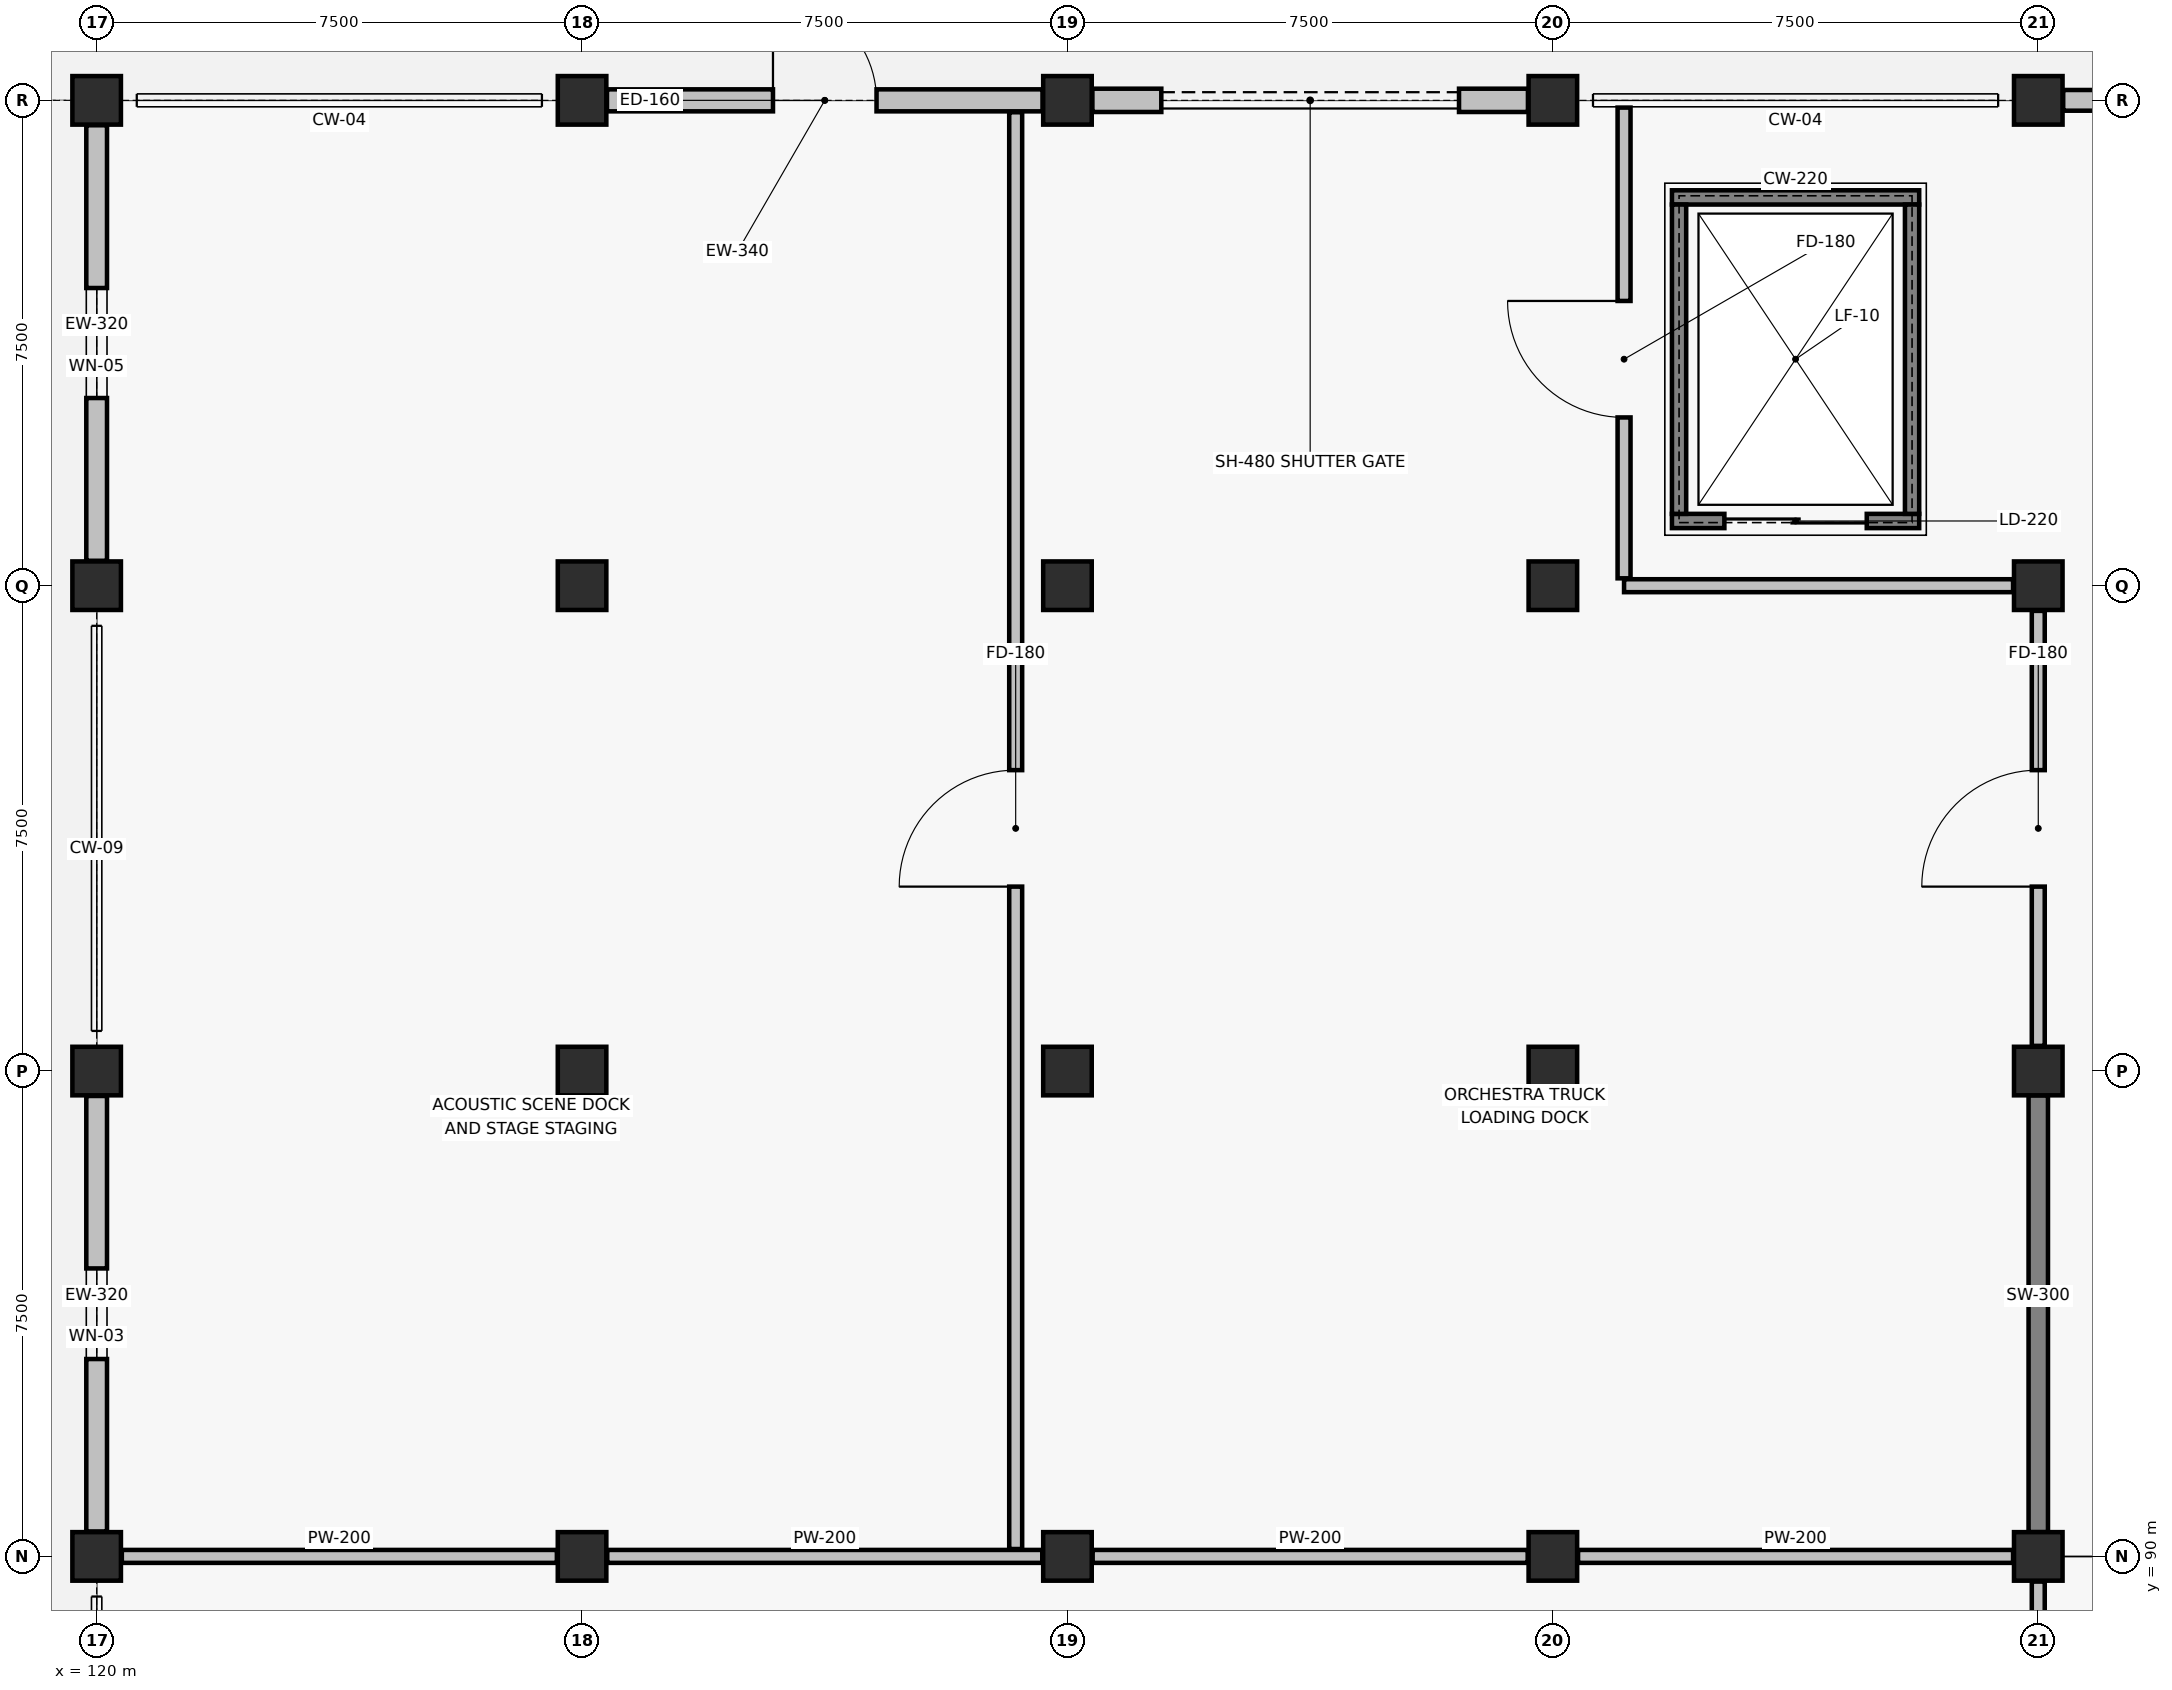
"""IFC4 building model, lengths in metres.
Left out: names, types, materials, properties, quantities, classifications, styles, units other than length and angle.
Written with IfcOpenShell. Run it as: python <this file> out.ifc"""

import sys

from ifc_helpers import new_model, si_unit, direction, frame, frame_2d, origin, origin_2d, place, context, subcontext, project, spatial, rectangle, extrude, element, fill, save


model = new_model("IFC4")
c1 = context("Model", 3, precision=1e-05, world=origin(), true_north=direction((0.0, 1.0)))
c2 = subcontext(c1, "Body", "Model", "MODEL_VIEW")
j1 = project(units=[si_unit("LENGTHUNIT", "METRE"), si_unit("PLANEANGLEUNIT", "RADIAN")], contexts=[c1])
p1 = place(None, origin())
s1 = spatial("IfcSite", under=j1, at=p1, CompositionType="ELEMENT")
p2 = place(p1, origin())
s2 = spatial("IfcBuilding", under=s1, at=p2, CompositionType="ELEMENT")
p3 = place(p2, origin())
s3 = spatial("IfcBuildingStorey", under=s2, at=p3, CompositionType="ELEMENT", Elevation=0.0)
for number, where, z_axis, x_axis in (
    (1, (120.0, 90.0, 0.0), (0.0, 0.0, 1.0), (1.0, 0.0, 0.0)),
    (2, (120.0, 97.5, 0.0), (0.0, 0.0, 1.0), (1.0, 0.0, 0.0)),
    (3, (120.0, 105.0, 0.0), (0.0, 0.0, 1.0), (1.0, 0.0, 0.0)),
    (4, (120.0, 112.5, 0.0), (0.0, 0.0, 1.0), (1.0, 0.0, 0.0)),
    (5, (127.5, 90.0, 0.0), (0.0, 0.0, 1.0), (1.0, 0.0, 0.0)),
    (6, (127.5, 97.5, 0.0), (0.0, 0.0, 1.0), (1.0, 0.0, 0.0)),
    (7, (127.5, 105.0, 0.0), (0.0, 0.0, 1.0), (1.0, 0.0, 0.0)),
    (8, (127.5, 112.5, 0.0), (0.0, 0.0, 1.0), (1.0, 0.0, 0.0)),
    (9, (135.0, 90.0, 0.0), (0.0, 0.0, 1.0), (1.0, 0.0, 0.0)),
    (10, (135.0, 97.5, 0.0), (0.0, 0.0, 1.0), (1.0, 0.0, 0.0)),
    (11, (135.0, 105.0, 0.0), (0.0, 0.0, 1.0), (1.0, 0.0, 0.0)),
    (12, (135.0, 112.5, 0.0), (0.0, 0.0, 1.0), (1.0, 0.0, 0.0)),
    (13, (142.5, 90.0, 0.0), (0.0, 0.0, 1.0), (1.0, 0.0, 0.0)),
    (14, (142.5, 97.5, 0.0), (0.0, 0.0, 1.0), (1.0, 0.0, 0.0)),
    (15, (142.5, 105.0, 0.0), (0.0, 0.0, 1.0), (1.0, 0.0, 0.0)),
    (16, (142.5, 112.5, 0.0), (0.0, 0.0, 1.0), (1.0, 0.0, 0.0)),
    (17, (150.0, 90.0, 0.0), (0.0, 0.0, 1.0), (1.0, 0.0, 0.0)),
    (18, (150.0, 97.5, 0.0), (0.0, 0.0, 1.0), (1.0, 0.0, 0.0)),
    (19, (150.0, 105.0, 0.0), (0.0, 0.0, 1.0), (1.0, 0.0, 0.0)),
    (20, (150.0, 112.5, 0.0), (0.0, 0.0, 1.0), (1.0, 0.0, 0.0)),
):
    element("IfcColumn", number, at=place(p3, frame(where, z_axis=z_axis, x_axis=x_axis)), inside=s3, PredefinedType="COLUMN", context=c2, shape_type="SweptSolid", body=[
        extrude(rectangle(XDim=0.75, YDim=0.75, at=origin_2d()), origin(), (0.0, 0.0, 1.0), 4.8),
    ])
p4 = place(p3, frame((150.0, 90.375, 0.0), z_axis=(0.0, 0.0, 1.0), x_axis=(0.0, 1.0, 0.0)))
e21 = element("IfcWall", 21, at=p4, inside=s3, PredefinedType="SHEAR", context=c2, shape_type="SweptSolid", body=[
    extrude(rectangle(XDim=6.75, YDim=0.3, at=frame_2d((3.375, 0.0))), origin(), (0.0, 0.0, 1.0), 4.5),
])
p5 = place(p3, frame((127.885, 112.5, 0.0), z_axis=(0.0, 0.0, 1.0), x_axis=(1.0, 0.0, 0.0)))
e22 = element("IfcWall", 22, at=p5, inside=s3, PredefinedType="SOLIDWALL", context=c2, shape_type="SweptSolid", body=[
    extrude(rectangle(XDim=6.73, YDim=0.34, at=frame_2d((3.365, 0.0))), origin(), (0.0, 0.0, 1.0), 3.72),
])
p6 = place(p5, frame((2.565, 0.0, 0.0)))
e23 = element("IfcOpeningElement", 23, at=p6, cuts=e22, PredefinedType="OPENING", context=c2, shape_type="SweptSolid", body=[
    extrude(rectangle(XDim=1.6, YDim=2.15, at=frame_2d((0.8, 1.075))), frame((0.0, 0.18, 0.0), z_axis=(0.0, -1.0, 0.0), x_axis=(1.0, 0.0, 0.0)), (0.0, 0.0, 1.0), 0.36),
])
p7 = place(p3, frame((135.385, 112.5, 0.0), z_axis=(0.0, 0.0, 1.0), x_axis=(1.0, 0.0, 0.0)))
e24 = element("IfcWall", 24, at=p7, inside=s3, PredefinedType="SOLIDWALL", context=c2, shape_type="SweptSolid", body=[
    extrude(rectangle(XDim=6.73, YDim=0.36, at=frame_2d((3.365, 0.0))), origin(), (0.0, 0.0, 1.0), 3.72),
])
p8 = place(p7, frame((1.065, 0.0, 0.0)))
e25 = element("IfcOpeningElement", 25, at=p8, cuts=e24, PredefinedType="OPENING", context=c2, shape_type="SweptSolid", body=[
    extrude(rectangle(XDim=4.6, YDim=3.1, at=frame_2d((2.3, 1.55))), frame((0.0, 0.19, 0.0), z_axis=(0.0, -1.0, 0.0), x_axis=(1.0, 0.0, 0.0)), (0.0, 0.0, 1.0), 0.38),
])
p9 = place(p3, frame((150.385, 112.5, 0.0), z_axis=(0.0, 0.0, 1.0), x_axis=(1.0, 0.0, 0.0)))
e26 = element("IfcWall", 26, at=p9, inside=s3, PredefinedType="SOLIDWALL", context=c2, shape_type="SweptSolid", body=[
    extrude(rectangle(XDim=6.73, YDim=0.32, at=frame_2d((3.365, 0.0))), origin(), (0.0, 0.0, 1.0), 3.72),
])
p10 = place(p9, frame((2.215, 0.0, 0.6)))
e27 = element("IfcOpeningElement", 27, at=p10, cuts=e26, PredefinedType="OPENING", context=c2, shape_type="SweptSolid", body=[
    extrude(rectangle(XDim=2.3, YDim=1.3, at=frame_2d((1.15, 0.65))), frame((0.0, 0.17, 0.0), z_axis=(0.0, -1.0, 0.0), x_axis=(1.0, 0.0, 0.0)), (0.0, 0.0, 1.0), 0.34),
])
p11 = place(p3, frame((120.0, 90.385, 0.0), z_axis=(0.0, 0.0, 1.0), x_axis=(0.0, 1.0, 0.0)))
e28 = element("IfcWall", 28, at=p11, inside=s3, PredefinedType="SOLIDWALL", context=c2, shape_type="SweptSolid", body=[
    extrude(rectangle(XDim=6.73, YDim=0.32, at=frame_2d((3.365, 0.0))), origin(), (0.0, 0.0, 1.0), 3.57),
])
p12 = place(p11, frame((2.665, 0.0, 0.6)))
e29 = element("IfcOpeningElement", 29, at=p12, cuts=e28, PredefinedType="OPENING", context=c2, shape_type="SweptSolid", body=[
    extrude(rectangle(XDim=1.4, YDim=1.8, at=frame_2d((0.7, 0.9))), frame((0.0, 0.17, 0.0), z_axis=(0.0, -1.0, 0.0), x_axis=(1.0, 0.0, 0.0)), (0.0, 0.0, 1.0), 0.34),
])
p13 = place(p3, frame((120.0, 105.385, 0.0), z_axis=(0.0, 0.0, 1.0), x_axis=(0.0, 1.0, 0.0)))
e30 = element("IfcWall", 30, at=p13, inside=s3, PredefinedType="SOLIDWALL", context=c2, shape_type="SweptSolid", body=[
    extrude(rectangle(XDim=6.73, YDim=0.32, at=frame_2d((3.365, 0.0))), origin(), (0.0, 0.0, 1.0), 3.62),
])
p14 = place(p13, frame((2.515, 0.0, 0.6)))
e31 = element("IfcOpeningElement", 31, at=p14, cuts=e30, PredefinedType="OPENING", context=c2, shape_type="SweptSolid", body=[
    extrude(rectangle(XDim=1.7, YDim=1.8, at=frame_2d((0.85, 0.9))), frame((0.0, 0.17, 0.0), z_axis=(0.0, -1.0, 0.0), x_axis=(1.0, 0.0, 0.0)), (0.0, 0.0, 1.0), 0.34),
])
p15 = place(p3, frame((144.34, 106.0, 0.0), z_axis=(0.0, 0.0, 1.0), x_axis=(1.0, 0.0, 0.0)))
e32 = element("IfcWall", 32, at=p15, inside=s3, PredefinedType="SOLIDWALL", context=c2, shape_type="SweptSolid", body=[
    extrude(rectangle(XDim=3.82, YDim=0.22, at=frame_2d((1.91, 0.0))), origin(), (0.0, 0.0, 1.0), 4.5),
])
p16 = place(p15, frame((0.81, 0.0, 0.0)))
e33 = element("IfcOpeningElement", 33, at=p16, cuts=e32, PredefinedType="OPENING", context=c2, shape_type="SweptSolid", body=[
    extrude(rectangle(XDim=2.2, YDim=2.35, at=frame_2d((1.1, 1.175))), frame((0.0, 0.12, 0.0), z_axis=(0.0, -1.0, 0.0), x_axis=(1.0, 0.0, 0.0)), (0.0, 0.0, 1.0), 0.24),
])
p17 = place(p3, frame((144.34, 111.0, 0.0), z_axis=(0.0, 0.0, 1.0), x_axis=(1.0, 0.0, 0.0)))
e34 = element("IfcWall", 34, at=p17, inside=s3, PredefinedType="SOLIDWALL", context=c2, shape_type="SweptSolid", body=[
    extrude(rectangle(XDim=3.82, YDim=0.22, at=frame_2d((1.91, 0.0))), origin(), (0.0, 0.0, 1.0), 4.5),
])
for number, where, z_axis, x_axis in (
    (35, (144.45, 106.11, 0.0), (0.0, 0.0, 1.0), (0.0, 1.0, 0.0)),
    (36, (148.05, 106.11, 0.0), (0.0, 0.0, 1.0), (0.0, 1.0, 0.0)),
):
    element("IfcWall", number, at=place(p3, frame(where, z_axis=z_axis, x_axis=x_axis)), inside=s3, PredefinedType="SOLIDWALL", context=c2, shape_type="SweptSolid", body=[
        extrude(rectangle(XDim=4.78, YDim=0.22, at=frame_2d((2.39, 0.0))), origin(), (0.0, 0.0, 1.0), 4.5),
    ])
p18 = place(p3, frame((143.6, 105.0, 0.0), z_axis=(0.0, 0.0, 1.0), x_axis=(1.0, 0.0, 0.0)))
e37 = element("IfcWall", 37, at=p18, inside=s3, PredefinedType="PARTITIONING", context=c2, shape_type="SweptSolid", body=[
    extrude(rectangle(XDim=6.011, YDim=0.2, at=frame_2d((3.005, 0.0))), origin(), (0.0, 0.0, 1.0), 3.62),
])
p19 = place(p3, frame((143.6, 105.114, 0.0), z_axis=(0.0, 0.0, 1.0), x_axis=(0.0, 1.0, 0.0)))
e38 = element("IfcWall", 38, at=p19, inside=s3, PredefinedType="PARTITIONING", context=c2, shape_type="SweptSolid", body=[
    extrude(rectangle(XDim=7.274, YDim=0.2, at=frame_2d((3.637, 0.0))), origin(), (0.0, 0.0, 1.0), 3.62),
])
p20 = place(p19, frame((2.486, 0.0, 0.0)))
e39 = element("IfcOpeningElement", 39, at=p20, cuts=e38, PredefinedType="OPENING", context=c2, shape_type="SweptSolid", body=[
    extrude(rectangle(XDim=1.8, YDim=2.18, at=frame_2d((0.9, 1.09))), frame((0.0, 0.11, 0.0), z_axis=(0.0, -1.0, 0.0), x_axis=(1.0, 0.0, 0.0)), (0.0, 0.0, 1.0), 0.22),
])
for number, where, z_axis, x_axis in (
    (40, (120.389, 90.0, 0.0), (0.0, 0.0, 1.0), (1.0, 0.0, 0.0)),
    (41, (127.889, 90.0, 0.0), (0.0, 0.0, 1.0), (1.0, 0.0, 0.0)),
    (42, (135.389, 90.0, 0.0), (0.0, 0.0, 1.0), (1.0, 0.0, 0.0)),
):
    element("IfcWall", number, at=place(p3, frame(where, z_axis=z_axis, x_axis=x_axis)), inside=s3, PredefinedType="PARTITIONING", context=c2, shape_type="SweptSolid", body=[
        extrude(rectangle(XDim=6.722, YDim=0.2, at=frame_2d((3.361, 0.0))), origin(), (0.0, 0.0, 1.0), 3.52),
    ])
p21 = place(p3, frame((142.889, 90.0, 0.0), z_axis=(0.0, 0.0, 1.0), x_axis=(1.0, 0.0, 0.0)))
e43 = element("IfcWall", 43, at=p21, inside=s3, PredefinedType="PARTITIONING", context=c2, shape_type="SweptSolid", body=[
    extrude(rectangle(XDim=6.722, YDim=0.2, at=frame_2d((3.361, 0.0))), origin(), (0.0, 0.0, 1.0), 3.42),
])
p22 = place(p3, frame((134.2, 90.114, 0.0), z_axis=(0.0, 0.0, 1.0), x_axis=(0.0, 1.0, 0.0)))
e44 = element("IfcWall", 44, at=p22, inside=s3, PredefinedType="PARTITIONING", context=c2, shape_type="SweptSolid", body=[
    extrude(rectangle(XDim=22.202, YDim=0.2, at=frame_2d((11.101, 0.0))), origin(), (0.0, 0.0, 1.0), 3.42),
])
p23 = place(p22, frame((10.236, 0.0, 0.0)))
e45 = element("IfcOpeningElement", 45, at=p23, cuts=e44, PredefinedType="OPENING", context=c2, shape_type="SweptSolid", body=[
    extrude(rectangle(XDim=1.8, YDim=2.18, at=frame_2d((0.9, 1.09))), frame((0.0, 0.11, 0.0), z_axis=(0.0, -1.0, 0.0), x_axis=(1.0, 0.0, 0.0)), (0.0, 0.0, 1.0), 0.22),
])
p24 = place(p3, frame((150.0, 82.889, 0.0), z_axis=(0.0, 0.0, 1.0), x_axis=(0.0, 1.0, 0.0)))
e46 = element("IfcWall", 46, at=p24, inside=s3, PredefinedType="PARTITIONING", context=c2, shape_type="SweptSolid", body=[
    extrude(rectangle(XDim=6.722, YDim=0.2, at=frame_2d((3.361, 0.0))), origin(), (0.0, 0.0, 1.0), 3.42),
])
p25 = place(p24, frame((2.261, 0.0, 0.0)))
e47 = element("IfcOpeningElement", 47, at=p25, cuts=e46, PredefinedType="OPENING", context=c2, shape_type="SweptSolid", body=[
    extrude(rectangle(XDim=2.2, YDim=2.18, at=frame_2d((1.1, 1.09))), frame((0.0, 0.11, 0.0), z_axis=(0.0, -1.0, 0.0), x_axis=(1.0, 0.0, 0.0)), (0.0, 0.0, 1.0), 0.22),
])
p26 = place(p3, frame((150.0, 97.889, 0.0), z_axis=(0.0, 0.0, 1.0), x_axis=(0.0, 1.0, 0.0)))
e48 = element("IfcWall", 48, at=p26, inside=s3, PredefinedType="PARTITIONING", context=c2, shape_type="SweptSolid", body=[
    extrude(rectangle(XDim=6.722, YDim=0.2, at=frame_2d((3.361, 0.0))), origin(), (0.0, 0.0, 1.0), 3.57),
])
p27 = place(p26, frame((2.461, 0.0, 0.0)))
e49 = element("IfcOpeningElement", 49, at=p27, cuts=e48, PredefinedType="OPENING", context=c2, shape_type="SweptSolid", body=[
    extrude(rectangle(XDim=1.8, YDim=2.18, at=frame_2d((0.9, 1.09))), frame((0.0, 0.11, 0.0), z_axis=(0.0, -1.0, 0.0), x_axis=(1.0, 0.0, 0.0)), (0.0, 0.0, 1.0), 0.22),
])
p28 = place(p6, origin())
e50 = element("IfcDoor", 50, at=p28, inside=s3, OperationType="SINGLE_SWING_LEFT", PredefinedType="DOOR", context=c2, shape_type="SweptSolid", body=[
    extrude(rectangle(XDim=1.6, YDim=2.15, at=frame_2d((0.8, 1.075))), frame((0.0, 0.025, 0.0), z_axis=(0.0, -1.0, 0.0), x_axis=(1.0, 0.0, 0.0)), (0.0, 0.0, 1.0), 0.05),
])
fill(e23, e50)
p29 = place(p8, origin())
e51 = element("IfcDoor", 51, at=p29, inside=s3, OperationType="ROLLINGUP", PredefinedType="GATE", context=c2, shape_type="SweptSolid", body=[
    extrude(rectangle(XDim=4.6, YDim=3.1, at=frame_2d((2.3, 1.55))), frame((0.0, 0.025, 0.0), z_axis=(0.0, -1.0, 0.0), x_axis=(1.0, 0.0, 0.0)), (0.0, 0.0, 1.0), 0.05),
])
fill(e25, e51)
p30 = place(p12, origin())
e52 = element("IfcWindow", 52, at=p30, inside=s3, PartitioningType="SINGLE_PANEL", PredefinedType="WINDOW", context=c2, shape_type="SweptSolid", body=[
    extrude(rectangle(XDim=1.4, YDim=1.8, at=frame_2d((0.7, 0.9))), frame((0.0, 0.03, 0.0), z_axis=(0.0, -1.0, 0.0), x_axis=(1.0, 0.0, 0.0)), (0.0, 0.0, 1.0), 0.06),
])
fill(e29, e52)
p31 = place(p14, origin())
e53 = element("IfcWindow", 53, at=p31, inside=s3, PartitioningType="SINGLE_PANEL", PredefinedType="WINDOW", context=c2, shape_type="SweptSolid", body=[
    extrude(rectangle(XDim=1.7, YDim=1.8, at=frame_2d((0.85, 0.9))), frame((0.0, 0.03, 0.0), z_axis=(0.0, -1.0, 0.0), x_axis=(1.0, 0.0, 0.0)), (0.0, 0.0, 1.0), 0.06),
])
fill(e31, e53)
p32 = place(p16, origin())
e54 = element("IfcDoor", 54, at=p32, inside=s3, OperationType="DOUBLE_DOOR_SLIDING", PredefinedType="DOOR", context=c2, shape_type="SweptSolid", body=[
    extrude(rectangle(XDim=2.2, YDim=2.35, at=frame_2d((1.1, 1.175))), frame((0.0, 0.025, 0.0), z_axis=(0.0, -1.0, 0.0), x_axis=(1.0, 0.0, 0.0)), (0.0, 0.0, 1.0), 0.05),
])
fill(e33, e54)
p33 = place(p20, origin())
e55 = element("IfcDoor", 55, at=p33, inside=s3, OperationType="SINGLE_SWING_RIGHT", PredefinedType="DOOR", context=c2, shape_type="SweptSolid", body=[
    extrude(rectangle(XDim=1.8, YDim=2.18, at=frame_2d((0.9, 1.09))), frame((0.0, 0.025, 0.0), z_axis=(0.0, -1.0, 0.0), x_axis=(1.0, 0.0, 0.0)), (0.0, 0.0, 1.0), 0.05),
])
fill(e39, e55)
p34 = place(p23, origin())
e56 = element("IfcDoor", 56, at=p34, inside=s3, OperationType="SINGLE_SWING_LEFT", PredefinedType="DOOR", context=c2, shape_type="SweptSolid", body=[
    extrude(rectangle(XDim=1.8, YDim=2.18, at=frame_2d((0.9, 1.09))), frame((0.0, 0.025, 0.0), z_axis=(0.0, -1.0, 0.0), x_axis=(1.0, 0.0, 0.0)), (0.0, 0.0, 1.0), 0.05),
])
fill(e45, e56)
p35 = place(p27, origin())
e57 = element("IfcDoor", 57, at=p35, inside=s3, OperationType="SINGLE_SWING_LEFT", PredefinedType="DOOR", context=c2, shape_type="SweptSolid", body=[
    extrude(rectangle(XDim=1.8, YDim=2.18, at=frame_2d((0.9, 1.09))), frame((0.0, 0.025, 0.0), z_axis=(0.0, -1.0, 0.0), x_axis=(1.0, 0.0, 0.0)), (0.0, 0.0, 1.0), 0.05),
])
fill(e49, e57)
save(model, sys.argv[1])
